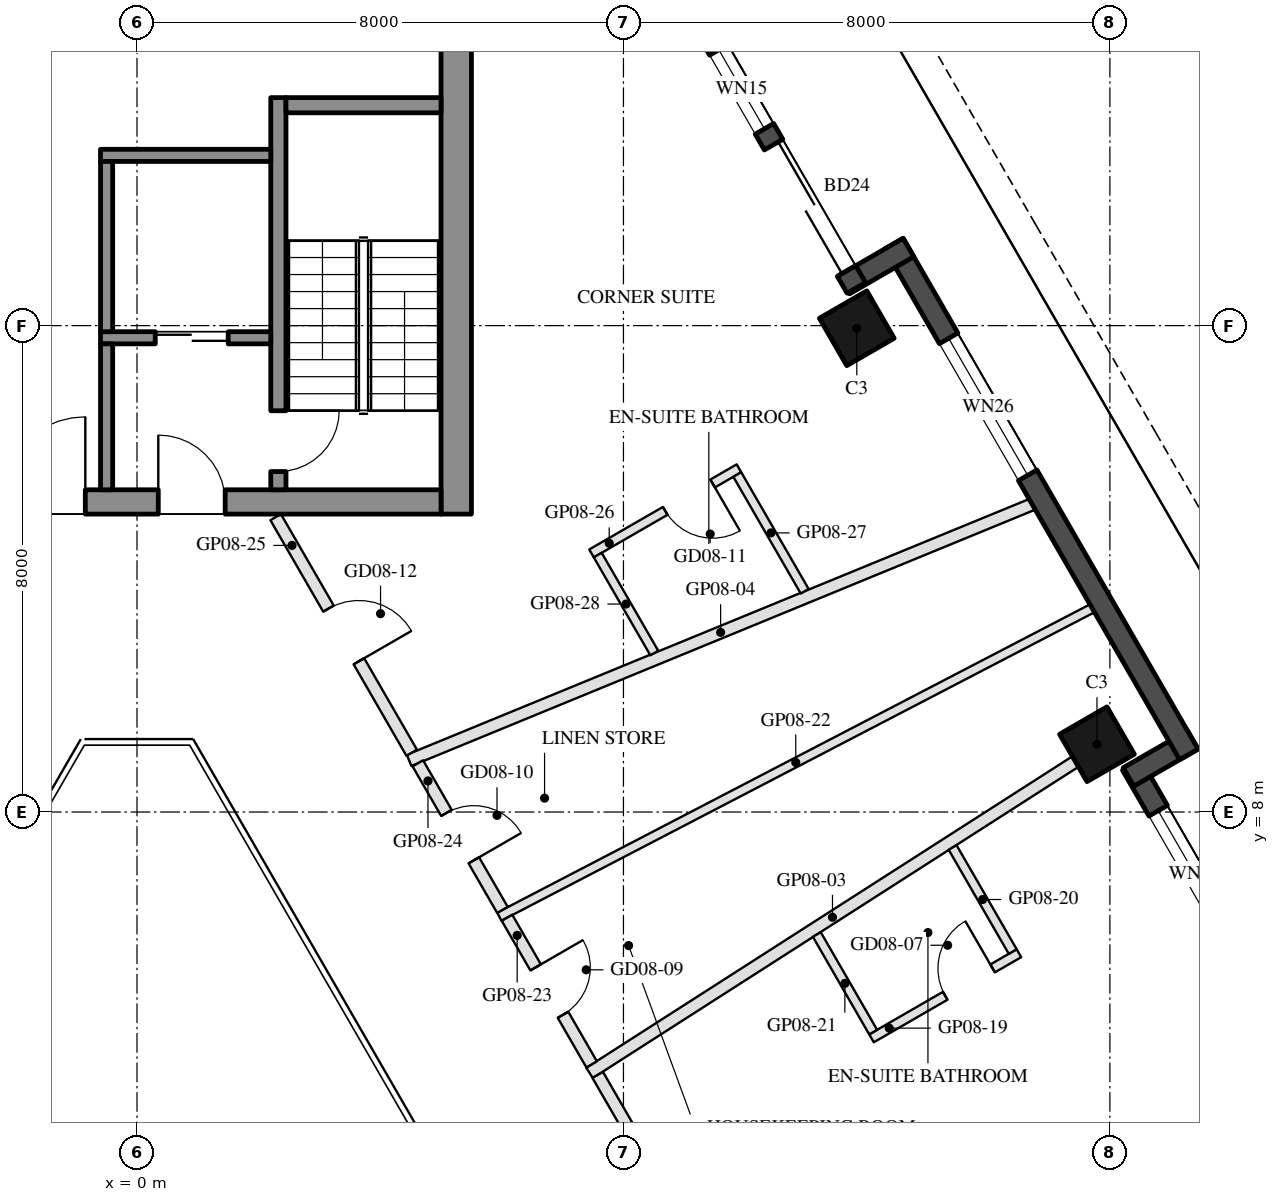
"""IFC4 building model, lengths in metres.
Left out: names, types, materials, properties, quantities, classifications, styles, units other than length and angle.
Written with IfcOpenShell. Run it as: python <this file> out.ifc"""

import sys

from ifc_helpers import new_model, si_unit, direction, frame, frame_2d, origin, origin_2d, place, context, subcontext, project, spatial, rectangle, hollow_rectangle, extrude, element, fill, save


model = new_model("IFC4")
c1 = context("Model", 3, precision=1e-05, world=origin(), true_north=direction((0.0, 1.0)))
c2 = subcontext(c1, "Body", "Model", "MODEL_VIEW")
j1 = project(units=[si_unit("LENGTHUNIT", "METRE"), si_unit("PLANEANGLEUNIT", "RADIAN")], contexts=[c1])
p1 = place(None, origin())
s1 = spatial("IfcSite", under=j1, at=p1, CompositionType="ELEMENT")
p2 = place(p1, origin())
s2 = spatial("IfcBuilding", under=s1, at=p2, CompositionType="ELEMENT")
p3 = place(p2, frame((0.0, 0.0, 105.7)))
s3 = spatial("IfcBuildingStorey", under=s2, at=p3, CompositionType="ELEMENT", Elevation=105.7)
for number, where, z_axis, x_axis in (
    (1, (15.788, 9.115, 0.0), (0.0, 0.0, 1.0), (-0.5, 0.866, 0.0)),
    (2, (11.838, 15.957, 0.0), (0.0, 0.0, 1.0), (-0.5, 0.866, 0.0)),
):
    element("IfcColumn", number, at=place(p3, frame(where, z_axis=z_axis, x_axis=x_axis)), inside=s3, PredefinedType="COLUMN", context=c2, shape_type="SweptSolid", body=[
        extrude(hollow_rectangle(XDim=0.9, YDim=0.9, WallThickness=0.04, at=origin_2d()), origin(), (0.0, 0.0, 1.0), 3.7),
    ])
p4 = place(p3, frame((19.729, 2.938, 0.0), z_axis=(0.0, 0.0, 1.0), x_axis=(-0.499976430342, 0.866039011305, 0.0)))
e3 = element("IfcWall", 3, at=p4, inside=s3, PredefinedType="SOLIDWALL", context=c2, shape_type="SweptSolid", body=[
    extrude(rectangle(XDim=6.74, YDim=0.35, at=frame_2d((3.37, 0.0))), origin(), (0.0, 0.0, 1.0), 3.55),
])
p5 = place(p4, frame((0.77, 0.0, 0.3)))
e4 = element("IfcOpeningElement", 4, at=p5, cuts=e3, PredefinedType="OPENING", context=c2, shape_type="SweptSolid", body=[
    extrude(rectangle(XDim=2.4, YDim=2.65, at=frame_2d((1.2, 1.325))), frame((0.0, 0.185, 0.0), z_axis=(0.0, -1.0, 0.0), x_axis=(1.0, 0.0, 0.0)), (0.0, 0.0, 1.0), 0.37),
])
p6 = place(p4, frame((3.47, 0.0, 0.3)))
e5 = element("IfcOpeningElement", 5, at=p6, cuts=e3, PredefinedType="OPENING", context=c2, shape_type="SweptSolid", body=[
    extrude(rectangle(XDim=2.4, YDim=2.65, at=frame_2d((1.2, 1.325))), frame((0.0, 0.185, 0.0), z_axis=(0.0, -1.0, 0.0), x_axis=(1.0, 0.0, 0.0)), (0.0, 0.0, 1.0), 0.37),
])
p7 = place(p3, frame((16.306, 8.577, 0.0), z_axis=(0.0, 0.0, 1.0), x_axis=(0.866092288191, 0.499884134912, 0.0)))
e6 = element("IfcWall", 6, at=p7, inside=s3, PredefinedType="SOLIDWALL", context=c2, shape_type="SweptSolid", body=[
    extrude(rectangle(XDim=1.22, YDim=0.35, at=frame_2d((0.61, 0.0))), origin(), (0.0, 0.0, 1.0), 3.55),
])
p8 = place(p3, frame((17.299, 8.948, 0.0), z_axis=(0.0, 0.0, 1.0), x_axis=(-0.500010041276, 0.866019606374, 0.0)))
e7 = element("IfcWall", 7, at=p8, inside=s3, PredefinedType="SOLIDWALL", context=c2, shape_type="SweptSolid", body=[
    extrude(rectangle(XDim=9.7, YDim=0.35, at=frame_2d((4.85, 0.0))), origin(), (0.0, 0.0, 1.0), 3.55),
])
p9 = place(p8, frame((5.301, 0.0, 0.3)))
e8 = element("IfcOpeningElement", 8, at=p9, cuts=e7, PredefinedType="OPENING", context=c2, shape_type="SweptSolid", body=[
    extrude(rectangle(XDim=2.6, YDim=2.65, at=frame_2d((1.3, 1.325))), frame((0.0, 0.185, 0.0), z_axis=(0.0, -1.0, 0.0), x_axis=(1.0, 0.0, 0.0)), (0.0, 0.0, 1.0), 0.37),
])
p10 = place(p3, frame((12.688, 17.284, 0.0), z_axis=(0.0, 0.0, 1.0), x_axis=(-0.865955602162, -0.500120880472, 0.0)))
e9 = element("IfcWall", 9, at=p10, inside=s3, PredefinedType="SOLIDWALL", context=c2, shape_type="SweptSolid", body=[
    extrude(rectangle(XDim=1.22, YDim=0.35, at=frame_2d((0.61, 0.0))), origin(), (0.0, 0.0, 1.0), 3.55),
])
p11 = place(p3, frame((11.829, 16.621, 0.0), z_axis=(0.0, 0.0, 1.0), x_axis=(-0.500003597184, 0.866023326939, 0.0)))
e10 = element("IfcWall", 10, at=p11, inside=s3, PredefinedType="SOLIDWALL", context=c2, shape_type="SweptSolid", body=[
    extrude(rectangle(XDim=6.74, YDim=0.35, at=frame_2d((3.37, 0.0))), origin(), (0.0, 0.0, 1.0), 3.55),
])
p12 = place(p11, frame((0.32, 0.0, 0.0)))
e11 = element("IfcOpeningElement", 11, at=p12, cuts=e10, PredefinedType="OPENING", context=c2, shape_type="SweptSolid", body=[
    extrude(rectangle(XDim=2.4, YDim=2.4, at=frame_2d((1.2, 1.2))), frame((0.0, 0.185, 0.0), z_axis=(0.0, -1.0, 0.0), x_axis=(1.0, 0.0, 0.0)), (0.0, 0.0, 1.0), 0.37),
])
p13 = place(p11, frame((3.02, 0.0, 0.3)))
e12 = element("IfcOpeningElement", 12, at=p13, cuts=e10, PredefinedType="OPENING", context=c2, shape_type="SweptSolid", body=[
    extrude(rectangle(XDim=1.5, YDim=2.65, at=frame_2d((0.75, 1.325))), frame((0.0, 0.185, 0.0), z_axis=(0.0, -1.0, 0.0), x_axis=(1.0, 0.0, 0.0)), (0.0, 0.0, 1.0), 0.37),
])
p14 = place(p11, frame((4.82, 0.0, 0.3)))
e13 = element("IfcOpeningElement", 13, at=p14, cuts=e10, PredefinedType="OPENING", context=c2, shape_type="SweptSolid", body=[
    extrude(rectangle(XDim=1.5, YDim=2.65, at=frame_2d((0.75, 1.325))), frame((0.0, 0.185, 0.0), z_axis=(0.0, -1.0, 0.0), x_axis=(1.0, 0.0, 0.0)), (0.0, 0.0, 1.0), 0.37),
])
p15 = place(p3, frame((5.25, 12.9, 0.0), z_axis=(0.0, 0.0, 1.0), x_axis=(0.0, 1.0, 0.0)))
e14 = element("IfcWall", 14, at=p15, inside=s3, PredefinedType="SHEAR", context=c2, shape_type="SweptSolid", body=[
    extrude(rectangle(XDim=14.837, YDim=0.5, at=frame_2d((7.418, 0.0))), origin(), (0.0, 0.0, 1.0), 3.5),
])
p16 = place(p3, frame((5.0, 13.1, 0.0), z_axis=(0.0, 0.0, 1.0), x_axis=(-1.0, 0.0, 0.0)))
e15 = element("IfcWall", 15, at=p16, inside=s3, PredefinedType="SHEAR", context=c2, shape_type="SweptSolid", body=[
    extrude(rectangle(XDim=10.0, YDim=0.4, at=frame_2d((5.0, 0.0))), origin(), (0.0, 0.0, 1.0), 3.5),
])
p17 = place(p16, frame((3.55, 0.0, 0.0)))
e16 = element("IfcOpeningElement", 16, at=p17, cuts=e15, PredefinedType="OPENING", context=c2, shape_type="SweptSolid", body=[
    extrude(rectangle(XDim=1.1, YDim=2.1, at=frame_2d((0.55, 1.05))), frame((0.0, 0.21, 0.0), z_axis=(0.0, -1.0, 0.0), x_axis=(1.0, 0.0, 0.0)), (0.0, 0.0, 1.0), 0.42),
])
p18 = place(p16, frame((5.85, 0.0, 0.0)))
e17 = element("IfcOpeningElement", 17, at=p18, cuts=e15, PredefinedType="OPENING", context=c2, shape_type="SweptSolid", body=[
    extrude(rectangle(XDim=1.4, YDim=2.1, at=frame_2d((0.7, 1.05))), frame((0.0, 0.21, 0.0), z_axis=(0.0, -1.0, 0.0), x_axis=(1.0, 0.0, 0.0)), (0.0, 0.0, 1.0), 0.42),
])
p19 = place(p3, frame((2.325, 13.3, 0.0), z_axis=(0.0, 0.0, 1.0), x_axis=(0.0, 1.0, 0.0)))
e18 = element("IfcWall", 18, at=p19, inside=s3, PredefinedType="SHEAR", context=c2, shape_type="SweptSolid", body=[
    extrude(rectangle(XDim=6.45, YDim=0.25, at=frame_2d((3.225, 0.0))), origin(), (0.0, 0.0, 1.0), 3.5),
])
p20 = place(p19, frame((0.3, 0.0, 0.0)))
e19 = element("IfcOpeningElement", 19, at=p20, cuts=e18, PredefinedType="OPENING", context=c2, shape_type="SweptSolid", body=[
    extrude(rectangle(XDim=1.0, YDim=2.1, at=frame_2d((0.5, 1.05))), frame((0.0, 0.135, 0.0), z_axis=(0.0, -1.0, 0.0), x_axis=(1.0, 0.0, 0.0)), (0.0, 0.0, 1.0), 0.27),
])
p21 = place(p3, frame((5.0, 19.625, 0.0), z_axis=(0.0, 0.0, 1.0), x_axis=(-1.0, 0.0, 0.0)))
e20 = element("IfcWall", 20, at=p21, inside=s3, PredefinedType="SHEAR", context=c2, shape_type="SweptSolid", body=[
    extrude(rectangle(XDim=2.55, YDim=0.25, at=frame_2d((1.275, 0.0))), origin(), (0.0, 0.0, 1.0), 3.5),
])
p22 = place(p3, frame((2.2, 18.8, 0.0), z_axis=(0.0, 0.0, 1.0), x_axis=(-1.0, 0.0, 0.0)))
e21 = element("IfcWall", 21, at=p22, inside=s3, PredefinedType="SHEAR", context=c2, shape_type="SweptSolid", body=[
    extrude(rectangle(XDim=2.8, YDim=0.2, at=frame_2d((1.4, 0.0))), origin(), (0.0, 0.0, 1.0), 3.5),
])
p23 = place(p3, frame((2.2, 15.8, 0.0), z_axis=(0.0, 0.0, 1.0), x_axis=(-1.0, 0.0, 0.0)))
e22 = element("IfcWall", 22, at=p23, inside=s3, PredefinedType="SHEAR", context=c2, shape_type="SweptSolid", body=[
    extrude(rectangle(XDim=2.8, YDim=0.2, at=frame_2d((1.4, 0.0))), origin(), (0.0, 0.0, 1.0), 3.5),
])
p24 = place(p23, frame((0.7, 0.0, 0.0)))
e23 = element("IfcOpeningElement", 23, at=p24, cuts=e22, PredefinedType="OPENING", context=c2, shape_type="SweptSolid", body=[
    extrude(rectangle(XDim=1.2, YDim=2.1, at=frame_2d((0.6, 1.05))), frame((0.0, 0.11, 0.0), z_axis=(0.0, -1.0, 0.0), x_axis=(1.0, 0.0, 0.0)), (0.0, 0.0, 1.0), 0.22),
])
p25 = place(p3, frame((-0.5, 15.9, 0.0), z_axis=(0.0, 0.0, 1.0), x_axis=(0.0, 1.0, 0.0)))
e24 = element("IfcWall", 24, at=p25, inside=s3, PredefinedType="SHEAR", context=c2, shape_type="SweptSolid", body=[
    extrude(rectangle(XDim=2.8, YDim=0.2, at=frame_2d((1.4, 0.0))), origin(), (0.0, 0.0, 1.0), 3.5),
])
p26 = place(p3, frame((-0.5, 13.3, 0.0), z_axis=(0.0, 0.0, 1.0), x_axis=(0.0, 1.0, 0.0)))
e25 = element("IfcWall", 25, at=p26, inside=s3, PredefinedType="SHEAR", context=c2, shape_type="SweptSolid", body=[
    extrude(rectangle(XDim=2.4, YDim=0.2, at=frame_2d((1.2, 0.0))), origin(), (0.0, 0.0, 1.0), 3.5),
])
p27 = place(p3, frame((15.433, 8.83, 0.0), z_axis=(0.0, 0.0, 1.0), x_axis=(-0.841935777146, -0.539577748949, 0.0)))
e26 = element("IfcWall", 26, at=p27, inside=s3, PredefinedType="PARTITIONING", context=c2, shape_type="SweptSolid", body=[
    extrude(rectangle(XDim=9.49, YDim=0.2, at=frame_2d((4.745, 0.0))), origin(), (0.0, 0.0, 1.0), 2.95),
])
p28 = place(p3, frame((14.722, 13.061, 0.0), z_axis=(0.0, 0.0, 1.0), x_axis=(-0.9249494111, -0.380090235214, 0.0)))
e27 = element("IfcWall", 27, at=p28, inside=s3, PredefinedType="PARTITIONING", context=c2, shape_type="SweptSolid", body=[
    extrude(rectangle(XDim=11.079, YDim=0.2, at=frame_2d((5.54, 0.0))), origin(), (0.0, 0.0, 1.0), 2.95),
])
p29 = place(p3, frame((7.577, 3.676, 0.0), z_axis=(0.0, 0.0, 1.0), x_axis=(0.500017489778, -0.866015305821, 0.0)))
e28 = element("IfcWall", 28, at=p29, inside=s3, PredefinedType="PARTITIONING", context=c2, shape_type="SweptSolid", body=[
    extrude(rectangle(XDim=9.384, YDim=0.2, at=frame_2d((4.692, 0.0))), origin(), (0.0, 0.0, 1.0), 2.95),
])
p30 = place(p29, frame((4.192, 0.0, 0.0)))
e29 = element("IfcOpeningElement", 29, at=p30, cuts=e28, PredefinedType="OPENING", context=c2, shape_type="SweptSolid", body=[
    extrude(rectangle(XDim=1.0, YDim=2.1, at=frame_2d((0.5, 1.05))), frame((0.0, 0.11, 0.0), z_axis=(0.0, -1.0, 0.0), x_axis=(1.0, 0.0, 0.0)), (0.0, 0.0, 1.0), 0.22),
])
p31 = place(p3, frame((12.079, 4.278, 0.0), z_axis=(0.0, 0.0, 1.0), x_axis=(0.866018616679, 0.500011755427, 0.0)))
e30 = element("IfcWall", 30, at=p31, inside=s3, PredefinedType="PARTITIONING", context=c2, shape_type="SweptSolid", body=[
    extrude(rectangle(XDim=2.8, YDim=0.15, at=frame_2d((1.4, 0.0))), origin(), (0.0, 0.0, 1.0), 3.55),
])
p32 = place(p31, frame((1.4, 0.0, 0.0)))
e31 = element("IfcOpeningElement", 31, at=p32, cuts=e30, PredefinedType="OPENING", context=c2, shape_type="SweptSolid", body=[
    extrude(rectangle(XDim=0.9, YDim=2.1, at=frame_2d((0.45, 1.05))), frame((0.0, 0.085, 0.0), z_axis=(0.0, -1.0, 0.0), x_axis=(1.0, 0.0, 0.0)), (0.0, 0.0, 1.0), 0.17),
])
p33 = place(p3, frame((14.402, 5.705, 0.0), z_axis=(0.0, 0.0, 1.0), x_axis=(-0.500018274647, 0.866014852655, 0.0)))
e32 = element("IfcWall", 32, at=p33, inside=s3, PredefinedType="PARTITIONING", context=c2, shape_type="SweptSolid", body=[
    extrude(rectangle(XDim=1.977, YDim=0.15, at=frame_2d((0.988, 0.0))), origin(), (0.0, 0.0, 1.0), 3.55),
])
p34 = place(p3, frame((12.107, 4.38, 0.0), z_axis=(0.0, 0.0, 1.0), x_axis=(-0.499893495202, 0.866086885627, 0.0)))
e33 = element("IfcWall", 33, at=p34, inside=s3, PredefinedType="PARTITIONING", context=c2, shape_type="SweptSolid", body=[
    extrude(rectangle(XDim=1.854, YDim=0.15, at=frame_2d((0.927, 0.0))), origin(), (0.0, 0.0, 1.0), 3.55),
])
p35 = place(p3, frame((15.709, 11.35, 0.0), z_axis=(0.0, 0.0, 1.0), x_axis=(-0.887196797294, -0.461391203721, 0.0)))
e34 = element("IfcWall", 34, at=p35, inside=s3, PredefinedType="PARTITIONING", context=c2, shape_type="SweptSolid", body=[
    extrude(rectangle(XDim=10.991, YDim=0.15, at=frame_2d((5.495, 0.0))), origin(), (0.0, 0.0, 1.0), 2.96),
])
p36 = place(p3, frame((6.085, 6.26, 0.0), z_axis=(0.0, 0.0, 1.0), x_axis=(0.499978037009, -0.866038083752, 0.0)))
e35 = element("IfcWall", 35, at=p36, inside=s3, PredefinedType="PARTITIONING", context=c2, shape_type="SweptSolid", body=[
    extrude(rectangle(XDim=2.784, YDim=0.2, at=frame_2d((1.392, 0.0))), origin(), (0.0, 0.0, 1.0), 2.95),
])
p37 = place(p36, frame((0.942, 0.0, 0.0)))
e36 = element("IfcOpeningElement", 36, at=p37, cuts=e35, PredefinedType="OPENING", context=c2, shape_type="SweptSolid", body=[
    extrude(rectangle(XDim=0.9, YDim=2.1, at=frame_2d((0.45, 1.05))), frame((0.0, 0.11, 0.0), z_axis=(0.0, -1.0, 0.0), x_axis=(1.0, 0.0, 0.0)), (0.0, 0.0, 1.0), 0.22),
])
p38 = place(p3, frame((4.618, 8.801, 0.0), z_axis=(0.0, 0.0, 1.0), x_axis=(0.499988210251, -0.866032210492, 0.0)))
e37 = element("IfcWall", 37, at=p38, inside=s3, PredefinedType="PARTITIONING", context=c2, shape_type="SweptSolid", body=[
    extrude(rectangle(XDim=2.783, YDim=0.2, at=frame_2d((1.392, 0.0))), origin(), (0.0, 0.0, 1.0), 2.95),
])
p39 = place(p38, frame((0.942, 0.0, 0.0)))
e38 = element("IfcOpeningElement", 38, at=p39, cuts=e37, PredefinedType="OPENING", context=c2, shape_type="SweptSolid", body=[
    extrude(rectangle(XDim=0.9, YDim=2.1, at=frame_2d((0.45, 1.05))), frame((0.0, 0.11, 0.0), z_axis=(0.0, -1.0, 0.0), x_axis=(1.0, 0.0, 0.0)), (0.0, 0.0, 1.0), 0.22),
])
p40 = place(p3, frame((2.281, 12.85, 0.0), z_axis=(0.0, 0.0, 1.0), x_axis=(0.499977539641, -0.866038370891, 0.0)))
e39 = element("IfcWall", 39, at=p40, inside=s3, PredefinedType="PARTITIONING", context=c2, shape_type="SweptSolid", body=[
    extrude(rectangle(XDim=4.474, YDim=0.2, at=frame_2d((2.237, 0.0))), origin(), (0.0, 0.0, 1.0), 2.95),
])
p41 = place(p40, frame((1.737, 0.0, 0.0)))
e40 = element("IfcOpeningElement", 40, at=p41, cuts=e39, PredefinedType="OPENING", context=c2, shape_type="SweptSolid", body=[
    extrude(rectangle(XDim=1.0, YDim=2.1, at=frame_2d((0.5, 1.05))), frame((0.0, 0.11, 0.0), z_axis=(0.0, -1.0, 0.0), x_axis=(1.0, 0.0, 0.0)), (0.0, 0.0, 1.0), 0.22),
])
p42 = place(p3, frame((9.9, 13.653, 0.0), z_axis=(0.0, 0.0, 1.0), x_axis=(-0.866056369097, -0.49994636267, 0.0)))
e41 = element("IfcWall", 41, at=p42, inside=s3, PredefinedType="PARTITIONING", context=c2, shape_type="SweptSolid", body=[
    extrude(rectangle(XDim=2.8, YDim=0.15, at=frame_2d((1.4, 0.0))), origin(), (0.0, 0.0, 1.0), 3.55),
])
p43 = place(p42, frame((0.5, 0.0, 0.0)))
e42 = element("IfcOpeningElement", 42, at=p43, cuts=e41, PredefinedType="OPENING", context=c2, shape_type="SweptSolid", body=[
    extrude(rectangle(XDim=0.9, YDim=2.1, at=frame_2d((0.45, 1.05))), frame((0.0, 0.085, 0.0), z_axis=(0.0, -1.0, 0.0), x_axis=(1.0, 0.0, 0.0)), (0.0, 0.0, 1.0), 0.17),
])
p44 = place(p3, frame((10.98, 11.631, 0.0), z_axis=(0.0, 0.0, 1.0), x_axis=(-0.500024353964, 0.86601134256, 0.0)))
e43 = element("IfcWall", 43, at=p44, inside=s3, PredefinedType="PARTITIONING", context=c2, shape_type="SweptSolid", body=[
    extrude(rectangle(XDim=2.217, YDim=0.15, at=frame_2d((1.108, 0.0))), origin(), (0.0, 0.0, 1.0), 3.55),
])
p45 = place(p3, frame((8.507, 10.615, 0.0), z_axis=(0.0, 0.0, 1.0), x_axis=(-0.499908018857, 0.866078502609, 0.0)))
e44 = element("IfcWall", 44, at=p45, inside=s3, PredefinedType="PARTITIONING", context=c2, shape_type="SweptSolid", body=[
    extrude(rectangle(XDim=1.86, YDim=0.15, at=frame_2d((0.93, 0.0))), origin(), (0.0, 0.0, 1.0), 3.55),
])
p46 = place(p6, origin())
e45 = element("IfcWindow", 45, at=p46, inside=s3, PartitioningType="SINGLE_PANEL", PredefinedType="WINDOW", context=c2, shape_type="SweptSolid", body=[
    extrude(rectangle(XDim=2.4, YDim=2.65, at=frame_2d((1.2, 1.325))), frame((0.0, 0.03, 0.0), z_axis=(0.0, -1.0, 0.0), x_axis=(1.0, 0.0, 0.0)), (0.0, 0.0, 1.0), 0.06),
])
fill(e5, e45)
p47 = place(p9, origin())
e46 = element("IfcWindow", 46, at=p47, inside=s3, PartitioningType="SINGLE_PANEL", PredefinedType="WINDOW", context=c2, shape_type="SweptSolid", body=[
    extrude(rectangle(XDim=2.6, YDim=2.65, at=frame_2d((1.3, 1.325))), frame((0.0, 0.03, 0.0), z_axis=(0.0, -1.0, 0.0), x_axis=(1.0, 0.0, 0.0)), (0.0, 0.0, 1.0), 0.06),
])
fill(e8, e46)
p48 = place(p12, frame((2.4, 0.0, 0.0), z_axis=(0.0, 0.0, 1.0), x_axis=(-1.0, 0.0, 0.0)))
e47 = element("IfcDoor", 47, at=p48, inside=s3, OperationType="SLIDING_TO_LEFT", PredefinedType="DOOR", context=c2, shape_type="SweptSolid", body=[
    extrude(rectangle(XDim=2.4, YDim=2.4, at=frame_2d((1.2, 1.2))), frame((0.0, 0.025, 0.0), z_axis=(0.0, -1.0, 0.0), x_axis=(1.0, 0.0, 0.0)), (0.0, 0.0, 1.0), 0.05),
])
fill(e11, e47)
p49 = place(p13, origin())
e48 = element("IfcWindow", 48, at=p49, inside=s3, PartitioningType="SINGLE_PANEL", PredefinedType="WINDOW", context=c2, shape_type="SweptSolid", body=[
    extrude(rectangle(XDim=1.5, YDim=2.65, at=frame_2d((0.75, 1.325))), frame((0.0, 0.03, 0.0), z_axis=(0.0, -1.0, 0.0), x_axis=(1.0, 0.0, 0.0)), (0.0, 0.0, 1.0), 0.06),
])
fill(e12, e48)
p50 = place(p24, origin())
e49 = element("IfcDoor", 49, at=p50, inside=s3, OperationType="DOUBLE_DOOR_SLIDING", PredefinedType="DOOR", context=c2, shape_type="SweptSolid", body=[
    extrude(rectangle(XDim=1.2, YDim=2.1, at=frame_2d((0.6, 1.05))), frame((0.0, 0.025, 0.0), z_axis=(0.0, -1.0, 0.0), x_axis=(1.0, 0.0, 0.0)), (0.0, 0.0, 1.0), 0.05),
])
fill(e23, e49)
p51 = place(p17, frame((1.1, 0.0, 0.0), z_axis=(0.0, 0.0, 1.0), x_axis=(-1.0, 0.0, 0.0)))
e50 = element("IfcDoor", 50, at=p51, inside=s3, OperationType="SINGLE_SWING_LEFT", PredefinedType="DOOR", context=c2, shape_type="SweptSolid", body=[
    extrude(rectangle(XDim=1.1, YDim=2.1, at=frame_2d((0.55, 1.05))), frame((0.0, 0.025, 0.0), z_axis=(0.0, -1.0, 0.0), x_axis=(1.0, 0.0, 0.0)), (0.0, 0.0, 1.0), 0.05),
])
fill(e16, e50)
p52 = place(p18, frame((1.4, 0.0, 0.0), z_axis=(0.0, 0.0, 1.0), x_axis=(-1.0, 0.0, 0.0)))
e51 = element("IfcDoor", 51, at=p52, inside=s3, OperationType="DOUBLE_DOOR_SINGLE_SWING", PredefinedType="DOOR", context=c2, shape_type="SweptSolid", body=[
    extrude(rectangle(XDim=1.4, YDim=2.1, at=frame_2d((0.7, 1.05))), frame((0.0, 0.025, 0.0), z_axis=(0.0, -1.0, 0.0), x_axis=(1.0, 0.0, 0.0)), (0.0, 0.0, 1.0), 0.05),
])
fill(e17, e51)
p53 = place(p20, frame((1.0, 0.0, 0.0), z_axis=(0.0, 0.0, 1.0), x_axis=(-1.0, 0.0, 0.0)))
e52 = element("IfcDoor", 52, at=p53, inside=s3, OperationType="SINGLE_SWING_LEFT", PredefinedType="DOOR", context=c2, shape_type="SweptSolid", body=[
    extrude(rectangle(XDim=1.0, YDim=2.1, at=frame_2d((0.5, 1.05))), frame((0.0, 0.025, 0.0), z_axis=(0.0, -1.0, 0.0), x_axis=(1.0, 0.0, 0.0)), (0.0, 0.0, 1.0), 0.05),
])
fill(e19, e52)
p54 = place(p32, origin())
e53 = element("IfcDoor", 53, at=p54, inside=s3, OperationType="SINGLE_SWING_RIGHT", PredefinedType="DOOR", context=c2, shape_type="SweptSolid", body=[
    extrude(rectangle(XDim=0.9, YDim=2.1, at=frame_2d((0.45, 1.05))), frame((0.0, 0.025, 0.0), z_axis=(0.0, -1.0, 0.0), x_axis=(1.0, 0.0, 0.0)), (0.0, 0.0, 1.0), 0.05),
])
fill(e31, e53)
p55 = place(p37, origin())
e54 = element("IfcDoor", 54, at=p55, inside=s3, OperationType="SINGLE_SWING_LEFT", PredefinedType="DOOR", context=c2, shape_type="SweptSolid", body=[
    extrude(rectangle(XDim=0.9, YDim=2.1, at=frame_2d((0.45, 1.05))), frame((0.0, 0.025, 0.0), z_axis=(0.0, -1.0, 0.0), x_axis=(1.0, 0.0, 0.0)), (0.0, 0.0, 1.0), 0.05),
])
fill(e36, e54)
p56 = place(p39, origin())
e55 = element("IfcDoor", 55, at=p56, inside=s3, OperationType="SINGLE_SWING_RIGHT", PredefinedType="DOOR", context=c2, shape_type="SweptSolid", body=[
    extrude(rectangle(XDim=0.9, YDim=2.1, at=frame_2d((0.45, 1.05))), frame((0.0, 0.025, 0.0), z_axis=(0.0, -1.0, 0.0), x_axis=(1.0, 0.0, 0.0)), (0.0, 0.0, 1.0), 0.05),
])
fill(e38, e55)
p57 = place(p43, origin())
e56 = element("IfcDoor", 56, at=p57, inside=s3, OperationType="SINGLE_SWING_LEFT", PredefinedType="DOOR", context=c2, shape_type="SweptSolid", body=[
    extrude(rectangle(XDim=0.9, YDim=2.1, at=frame_2d((0.45, 1.05))), frame((0.0, 0.025, 0.0), z_axis=(0.0, -1.0, 0.0), x_axis=(1.0, 0.0, 0.0)), (0.0, 0.0, 1.0), 0.05),
])
fill(e42, e56)
p58 = place(p41, origin())
e57 = element("IfcDoor", 57, at=p58, inside=s3, OperationType="SINGLE_SWING_RIGHT", PredefinedType="DOOR", context=c2, shape_type="SweptSolid", body=[
    extrude(rectangle(XDim=1.0, YDim=2.1, at=frame_2d((0.5, 1.05))), frame((0.0, 0.025, 0.0), z_axis=(0.0, -1.0, 0.0), x_axis=(1.0, 0.0, 0.0)), (0.0, 0.0, 1.0), 0.05),
])
fill(e40, e57)
save(model, sys.argv[1])
